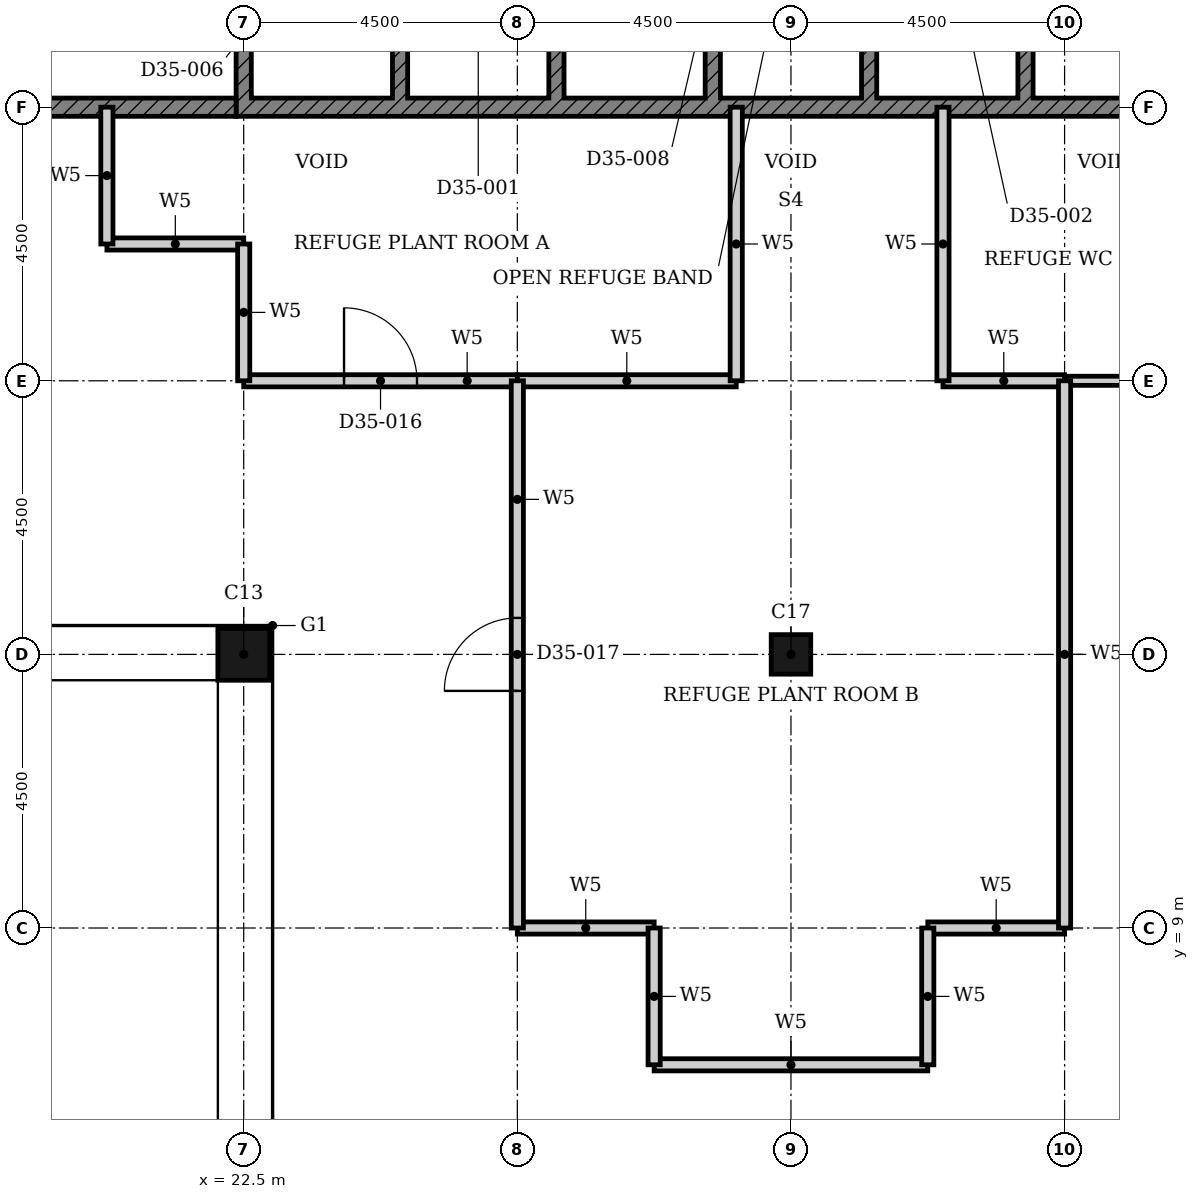
"""IFC4 building model, lengths in metres.
Left out: names, types, materials, properties, quantities, classifications, styles, units other than length and angle.
Written with IfcOpenShell. Run it as: python <this file> out.ifc"""

import sys

from ifc_helpers import new_model, si_unit, direction, frame, frame_2d, origin, origin_2d, place, context, subcontext, project, spatial, polyline, rectangle, hollow_rectangle, outline, extrude, element, fill, save


model = new_model("IFC4")
c1 = context("Model", 3, precision=1e-05, world=origin(), true_north=direction((0.0, 1.0)))
c2 = subcontext(c1, "Body", "Model", "MODEL_VIEW")
j1 = project(units=[si_unit("LENGTHUNIT", "METRE"), si_unit("PLANEANGLEUNIT", "RADIAN")], contexts=[c1])
p1 = place(None, origin())
s1 = spatial("IfcSite", under=j1, at=p1, CompositionType="ELEMENT")
p2 = place(p1, origin())
s2 = spatial("IfcBuilding", under=s1, at=p2, CompositionType="ELEMENT")
p3 = place(p2, frame((0.0, 0.0, 140.4)))
s3 = spatial("IfcBuildingStorey", under=s2, at=p3, CompositionType="ELEMENT", Elevation=140.4)
p4 = place(p3, frame((22.5, 13.5, 0.0), z_axis=(0.0, 0.0, 1.0), x_axis=(1.0, 0.0, 0.0)))
e1 = element("IfcColumn", 1, at=p4, inside=s3, PredefinedType="COLUMN", context=c2, shape_type="SweptSolid", body=[
    extrude(hollow_rectangle(XDim=0.85, YDim=0.85, WallThickness=0.026, at=origin_2d()), origin(), (0.0, 0.0, 1.0), 4.8),
])
p5 = place(p3, frame((31.5, 13.5, 0.0), z_axis=(0.0, 0.0, 1.0), x_axis=(1.0, 0.0, 0.0)))
e2 = element("IfcColumn", 2, at=p5, inside=s3, PredefinedType="COLUMN", context=c2, shape_type="SweptSolid", body=[
    extrude(hollow_rectangle(XDim=0.65, YDim=0.65, WallThickness=0.021, at=origin_2d()), origin(), (0.0, 0.0, 1.0), 4.8),
])
p6 = place(p3, origin())
e3 = element("IfcWall", 3, at=p6, inside=s3, PredefinedType="SHEAR", context=c2, shape_type="SweptSolid", body=[
    extrude(outline(polyline([(22.375, 22.35), (38.053, 22.35), (38.053, 25.275), (37.803, 25.275), (37.803, 22.65), (35.482, 22.65), (35.482, 25.275), (35.232, 25.275), (35.232, 22.65), (32.911, 22.65), (32.911, 25.275), (32.661, 25.275), (32.661, 22.65), (30.339, 22.65), (30.339, 25.275), (30.089, 25.275), (30.089, 22.65), (27.768, 22.65), (27.768, 25.275), (27.518, 25.275), (27.518, 22.65), (25.197, 22.65), (25.197, 25.275), (24.947, 25.275), (24.947, 22.65), (22.625, 22.65), (22.625, 25.275), (22.375, 25.275), (22.375, 22.35)])), origin(), (0.0, 0.0, 1.0), 4.45),
])
p7 = place(p3, frame((18.15, 22.5, 0.0), z_axis=(0.0, 0.0, 1.0), x_axis=(1.0, 0.0, 0.0)))
e4 = element("IfcWall", 4, at=p7, inside=s3, PredefinedType="SHEAR", context=c2, shape_type="SweptSolid", body=[
    extrude(rectangle(XDim=4.225, YDim=0.3, at=frame_2d((2.113, 0.0))), origin(), (0.0, 0.0, 1.0), 4.45),
])
p8 = place(p3, frame((36.0, 18.0, 0.0), z_axis=(0.0, 0.0, 1.0), x_axis=(1.0, 0.0, 0.0)))
e5 = element("IfcWall", 5, at=p8, inside=s3, PredefinedType="PARTITIONING", context=c2, shape_type="SweptSolid", body=[
    extrude(rectangle(XDim=2.0, YDim=0.15, at=frame_2d((1.0, 0.0))), origin(), (0.0, 0.0, 1.0), 4.45),
])
p9 = place(p3, frame((22.5, 18.0, 0.0), z_axis=(0.0, 0.0, 1.0), x_axis=(1.0, 0.0, 0.0)))
e6 = element("IfcWall", 6, at=p9, inside=s3, PredefinedType="PARTITIONING", context=c2, shape_type="SweptSolid", body=[
    extrude(rectangle(XDim=4.5, YDim=0.2, at=frame_2d((2.25, 0.0))), origin(), (0.0, 0.0, 1.0), 4.45),
])
p10 = place(p9, frame((1.65, 0.0, 0.0)))
e7 = element("IfcOpeningElement", 7, at=p10, cuts=e6, PredefinedType="OPENING", context=c2, shape_type="SweptSolid", body=[
    extrude(rectangle(XDim=1.2, YDim=2.1, at=frame_2d((0.6, 1.05))), frame((0.0, 0.11, 0.0), z_axis=(0.0, -1.0, 0.0), x_axis=(1.0, 0.0, 0.0)), (0.0, 0.0, 1.0), 0.22),
])
p11 = place(p3, frame((27.0, 18.0, 0.0), z_axis=(0.0, 0.0, 1.0), x_axis=(1.0, 0.0, 0.0)))
e8 = element("IfcWall", 8, at=p11, inside=s3, PredefinedType="PARTITIONING", context=c2, shape_type="SweptSolid", body=[
    extrude(rectangle(XDim=3.6, YDim=0.2, at=frame_2d((1.8, 0.0))), origin(), (0.0, 0.0, 1.0), 4.45),
])
p12 = place(p3, frame((34.0, 18.0, 0.0), z_axis=(0.0, 0.0, 1.0), x_axis=(1.0, 0.0, 0.0)))
e9 = element("IfcWall", 9, at=p12, inside=s3, PredefinedType="PARTITIONING", context=c2, shape_type="SweptSolid", body=[
    extrude(rectangle(XDim=2.0, YDim=0.2, at=frame_2d((1.0, 0.0))), origin(), (0.0, 0.0, 1.0), 4.45),
])
p13 = place(p3, frame((20.25, 20.25, 0.0), z_axis=(0.0, 0.0, 1.0), x_axis=(1.0, 0.0, 0.0)))
e10 = element("IfcWall", 10, at=p13, inside=s3, PredefinedType="PARTITIONING", context=c2, shape_type="SweptSolid", body=[
    extrude(rectangle(XDim=2.25, YDim=0.2, at=frame_2d((1.125, 0.0))), origin(), (0.0, 0.0, 1.0), 4.45),
])
p14 = place(p3, frame((29.25, 6.75, 0.0), z_axis=(0.0, 0.0, 1.0), x_axis=(1.0, 0.0, 0.0)))
e11 = element("IfcWall", 11, at=p14, inside=s3, PredefinedType="PARTITIONING", context=c2, shape_type="SweptSolid", body=[
    extrude(rectangle(XDim=4.5, YDim=0.2, at=frame_2d((2.25, 0.0))), origin(), (0.0, 0.0, 1.0), 4.45),
])
for number, where, z_axis, x_axis in (
    (12, (27.0, 9.0, 0.0), (0.0, 0.0, 1.0), (1.0, 0.0, 0.0)),
    (13, (33.75, 9.0, 0.0), (0.0, 0.0, 1.0), (1.0, 0.0, 0.0)),
    (14, (20.25, 20.25, 0.0), (0.0, 0.0, 1.0), (0.0, 1.0, 0.0)),
    (15, (22.5, 18.0, 0.0), (0.0, 0.0, 1.0), (0.0, 1.0, 0.0)),
):
    element("IfcWall", number, at=place(p3, frame(where, z_axis=z_axis, x_axis=x_axis)), inside=s3, PredefinedType="PARTITIONING", context=c2, shape_type="SweptSolid", body=[
        extrude(rectangle(XDim=2.25, YDim=0.2, at=frame_2d((1.125, 0.0))), origin(), (0.0, 0.0, 1.0), 4.45),
    ])
p15 = place(p3, frame((27.0, 9.0, 0.0), z_axis=(0.0, 0.0, 1.0), x_axis=(0.0, 1.0, 0.0)))
e16 = element("IfcWall", 16, at=p15, inside=s3, PredefinedType="PARTITIONING", context=c2, shape_type="SweptSolid", body=[
    extrude(rectangle(XDim=9.0, YDim=0.2, at=frame_2d((4.5, 0.0))), origin(), (0.0, 0.0, 1.0), 3.73),
])
p16 = place(p15, frame((3.9, 0.0, 0.0)))
e17 = element("IfcOpeningElement", 17, at=p16, cuts=e16, PredefinedType="OPENING", context=c2, shape_type="SweptSolid", body=[
    extrude(rectangle(XDim=1.2, YDim=2.1, at=frame_2d((0.6, 1.05))), frame((0.0, 0.11, 0.0), z_axis=(0.0, -1.0, 0.0), x_axis=(1.0, 0.0, 0.0)), (0.0, 0.0, 1.0), 0.22),
])
p17 = place(p3, frame((29.25, 6.75, 0.0), z_axis=(0.0, 0.0, 1.0), x_axis=(0.0, 1.0, 0.0)))
e18 = element("IfcWall", 18, at=p17, inside=s3, PredefinedType="PARTITIONING", context=c2, shape_type="SweptSolid", body=[
    extrude(rectangle(XDim=2.25, YDim=0.2, at=frame_2d((1.125, 0.0))), origin(), (0.0, 0.0, 1.0), 4.45),
])
p18 = place(p3, frame((30.6, 18.0, 0.0), z_axis=(0.0, 0.0, 1.0), x_axis=(0.0, 1.0, 0.0)))
e19 = element("IfcWall", 19, at=p18, inside=s3, PredefinedType="PARTITIONING", context=c2, shape_type="SweptSolid", body=[
    extrude(rectangle(XDim=4.5, YDim=0.2, at=frame_2d((2.25, 0.0))), origin(), (0.0, 0.0, 1.0), 4.45),
])
p19 = place(p3, frame((33.75, 6.75, 0.0), z_axis=(0.0, 0.0, 1.0), x_axis=(0.0, 1.0, 0.0)))
e20 = element("IfcWall", 20, at=p19, inside=s3, PredefinedType="PARTITIONING", context=c2, shape_type="SweptSolid", body=[
    extrude(rectangle(XDim=2.25, YDim=0.2, at=frame_2d((1.125, 0.0))), origin(), (0.0, 0.0, 1.0), 4.45),
])
p20 = place(p3, frame((34.0, 18.0, 0.0), z_axis=(0.0, 0.0, 1.0), x_axis=(0.0, 1.0, 0.0)))
e21 = element("IfcWall", 21, at=p20, inside=s3, PredefinedType="PARTITIONING", context=c2, shape_type="SweptSolid", body=[
    extrude(rectangle(XDim=4.5, YDim=0.2, at=frame_2d((2.25, 0.0))), origin(), (0.0, 0.0, 1.0), 4.45),
])
p21 = place(p3, frame((36.0, 9.0, 0.0), z_axis=(0.0, 0.0, 1.0), x_axis=(0.0, 1.0, 0.0)))
e22 = element("IfcWall", 22, at=p21, inside=s3, PredefinedType="PARTITIONING", context=c2, shape_type="SweptSolid", body=[
    extrude(rectangle(XDim=9.0, YDim=0.2, at=frame_2d((4.5, 0.0))), origin(), (0.0, 0.0, 1.0), 3.73),
])
p22 = place(p10, origin())
e23 = element("IfcDoor", 23, at=p22, inside=s3, OperationType="SINGLE_SWING_LEFT", PredefinedType="DOOR", context=c2, shape_type="SweptSolid", body=[
    extrude(rectangle(XDim=1.2, YDim=2.1, at=frame_2d((0.6, 1.05))), frame((0.0, 0.025, 0.0), z_axis=(0.0, -1.0, 0.0), x_axis=(1.0, 0.0, 0.0)), (0.0, 0.0, 1.0), 0.05),
])
fill(e7, e23)
p23 = place(p16, origin())
e24 = element("IfcDoor", 24, at=p23, inside=s3, OperationType="SINGLE_SWING_RIGHT", PredefinedType="DOOR", context=c2, shape_type="SweptSolid", body=[
    extrude(rectangle(XDim=1.2, YDim=2.1, at=frame_2d((0.6, 1.05))), frame((0.0, 0.025, 0.0), z_axis=(0.0, -1.0, 0.0), x_axis=(1.0, 0.0, 0.0)), (0.0, 0.0, 1.0), 0.05),
])
fill(e17, e24)
save(model, sys.argv[1])
